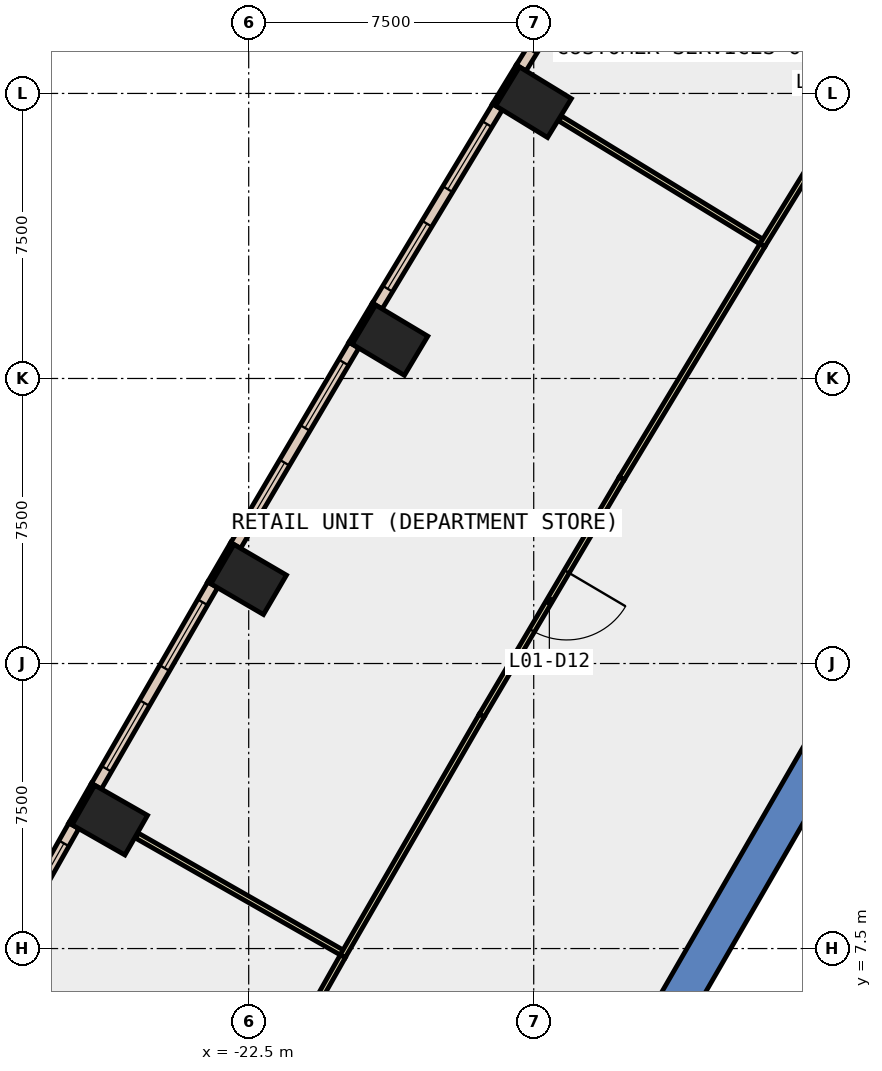
"""IFC4 building model, lengths in metres.
Left out: names, types, materials, properties, quantities, classifications, styles, units other than length and angle.
Written with IfcOpenShell. Run it as: python <this file> out.ifc"""

import sys

from ifc_helpers import new_model, si_unit, direction, frame, frame_2d, origin, origin_2d, place, context, subcontext, project, spatial, polyline, rectangle, outline, extrude, element, fill, save


model = new_model("IFC4")
c1 = context("Model", 3, precision=1e-05, world=origin(), true_north=direction((0.0, 1.0)))
c2 = subcontext(c1, "Body", "Model", "MODEL_VIEW")
j1 = project(units=[si_unit("LENGTHUNIT", "METRE"), si_unit("PLANEANGLEUNIT", "RADIAN")], contexts=[c1])
p1 = place(None, origin())
s1 = spatial("IfcSite", under=j1, at=p1, CompositionType="ELEMENT")
p2 = place(p1, origin())
s2 = spatial("IfcBuilding", under=s1, at=p2, CompositionType="ELEMENT")
p3 = place(p2, frame((0.0, 0.0, 9.0)))
s3 = spatial("IfcBuildingStorey", under=s2, at=p3, CompositionType="ELEMENT", Elevation=9.0)
for number, where, z_axis, x_axis in (
    (1, (-15.005, 29.769, -0.45), (0.0, 0.0, 1.0), (0.522, 0.853, 0.0)),
    (2, (-18.782, 23.508, -0.45), (0.0, 0.0, 1.0), (0.513, 0.858, 0.0)),
    (3, (-22.5, 17.211, -0.45), (0.0, 0.0, 1.0), (0.504, 0.864, 0.0)),
    (4, (-26.155, 10.88, -0.45), (0.0, 0.0, 1.0), (0.496, 0.869, 0.0)),
):
    element("IfcColumn", number, at=place(p3, frame(where, z_axis=z_axis, x_axis=x_axis)), inside=s3, PredefinedType="COLUMN", context=c2, shape_type="SweptSolid", body=[
        extrude(rectangle(XDim=1.2, YDim=1.6, at=origin_2d()), origin(), (0.0, 0.0, 1.0), 6.0),
    ])
p4 = place(p3, frame((0.0, 0.0, -0.45)))
e5 = element("IfcWall", 5, at=p4, inside=s3, PredefinedType="SHEAR", context=c2, shape_type="SweptSolid", body=[
    extrude(outline(polyline([(-12.267, 5.252), (-11.402, 4.752), (-6.351, 13.5), (-6.928, 14.5), (-12.267, 5.252)])), origin(), (0.0, 0.0, 1.0), 6.0),
])
p5 = place(p3, frame((-15.417, 30.724, 0.0), z_axis=(0.0, 0.0, 1.0), x_axis=(-0.521507599072, -0.853246637327, 0.0)))
e6 = element("IfcWall", 6, at=p5, inside=s3, PredefinedType="STANDARD", context=c2, shape_type="SweptSolid", body=[
    extrude(rectangle(XDim=1.2, YDim=0.1, at=frame_2d((0.6, 0.0))), origin(), (0.0, 0.0, 1.0), 5.55),
])
p6 = place(p3, frame((-19.204, 24.459, 0.0), z_axis=(0.0, 0.0, 1.0), x_axis=(-0.513238760752, -0.858245870635, 0.0)))
e7 = element("IfcWall", 7, at=p6, inside=s3, PredefinedType="STANDARD", context=c2, shape_type="SweptSolid", body=[
    extrude(rectangle(XDim=1.2, YDim=0.1, at=frame_2d((0.6, 0.0))), origin(), (0.0, 0.0, 1.0), 5.55),
])
p7 = place(p3, frame((-22.931, 18.158, 0.0), z_axis=(0.0, 0.0, 1.0), x_axis=(-0.504313844903, -0.863520437418, 0.0)))
e8 = element("IfcWall", 8, at=p7, inside=s3, PredefinedType="STANDARD", context=c2, shape_type="SweptSolid", body=[
    extrude(rectangle(XDim=1.2, YDim=0.1, at=frame_2d((0.6, 0.0))), origin(), (0.0, 0.0, 1.0), 5.55),
])
p8 = place(p3, frame((-26.596, 11.822, 0.0), z_axis=(0.0, 0.0, 1.0), x_axis=(-0.495854054996, -0.868405870629, 0.0)))
e9 = element("IfcWall", 9, at=p8, inside=s3, PredefinedType="STANDARD", context=c2, shape_type="SweptSolid", body=[
    extrude(rectangle(XDim=1.2, YDim=0.1, at=frame_2d((0.6, 0.0))), origin(), (0.0, 0.0, 1.0), 5.55),
])
p9 = place(p3, frame((-12.117, 35.881, 0.0), z_axis=(0.0, 0.0, 1.0), x_axis=(-0.524953701886, -0.85113078365, 0.0)))
e10 = element("IfcWall", 10, at=p9, inside=s3, PredefinedType="STANDARD", context=c2, shape_type="SweptSolid", body=[
    extrude(rectangle(XDim=6.123, YDim=0.3, at=frame_2d((3.061, 0.0))), origin(), (0.0, 0.0, 1.0), 5.55),
])
p10 = place(p9, frame((0.531, 0.0, 1.0)))
e11 = element("IfcOpeningElement", 11, at=p10, cuts=e10, PredefinedType="OPENING", context=c2, shape_type="SweptSolid", body=[
    extrude(rectangle(XDim=2.0, YDim=4.0, at=frame_2d((1.0, 2.0))), frame((0.0, 0.16, 0.0), z_axis=(0.0, -1.0, 0.0), x_axis=(1.0, 0.0, 0.0)), (0.0, 0.0, 1.0), 0.32),
])
p11 = place(p9, frame((3.592, 0.0, 1.0)))
e12 = element("IfcOpeningElement", 12, at=p11, cuts=e10, PredefinedType="OPENING", context=c2, shape_type="SweptSolid", body=[
    extrude(rectangle(XDim=2.0, YDim=4.0, at=frame_2d((1.0, 2.0))), frame((0.0, 0.16, 0.0), z_axis=(0.0, -1.0, 0.0), x_axis=(1.0, 0.0, 0.0)), (0.0, 0.0, 1.0), 0.32),
])
p12 = place(p3, frame((-15.954, 29.647, 0.0), z_axis=(0.0, 0.0, 1.0), x_axis=(-0.516687651362, -0.85617397235, 0.0)))
e13 = element("IfcWall", 13, at=p12, inside=s3, PredefinedType="STANDARD", context=c2, shape_type="SweptSolid", body=[
    extrude(rectangle(XDim=6.121, YDim=0.3, at=frame_2d((3.061, 0.0))), origin(), (0.0, 0.0, 1.0), 5.55),
])
p13 = place(p12, frame((0.53, 0.0, 1.0)))
e14 = element("IfcOpeningElement", 14, at=p13, cuts=e13, PredefinedType="OPENING", context=c2, shape_type="SweptSolid", body=[
    extrude(rectangle(XDim=2.0, YDim=4.0, at=frame_2d((1.0, 2.0))), frame((0.0, 0.16, 0.0), z_axis=(0.0, -1.0, 0.0), x_axis=(1.0, 0.0, 0.0)), (0.0, 0.0, 1.0), 0.32),
])
p14 = place(p12, frame((3.591, 0.0, 1.0)))
e15 = element("IfcOpeningElement", 15, at=p14, cuts=e13, PredefinedType="OPENING", context=c2, shape_type="SweptSolid", body=[
    extrude(rectangle(XDim=2.0, YDim=4.0, at=frame_2d((1.0, 2.0))), frame((0.0, 0.16, 0.0), z_axis=(0.0, -1.0, 0.0), x_axis=(1.0, 0.0, 0.0)), (0.0, 0.0, 1.0), 0.32),
])
p15 = place(p3, frame((-19.731, 23.377, 0.0), z_axis=(0.0, 0.0, 1.0), x_axis=(-0.50834231483, -0.861155091115, 0.0)))
e16 = element("IfcWall", 16, at=p15, inside=s3, PredefinedType="STANDARD", context=c2, shape_type="SweptSolid", body=[
    extrude(rectangle(XDim=6.122, YDim=0.3, at=frame_2d((3.061, 0.0))), origin(), (0.0, 0.0, 1.0), 5.55),
])
p16 = place(p15, frame((0.53, 0.0, 1.0)))
e17 = element("IfcOpeningElement", 17, at=p16, cuts=e16, PredefinedType="OPENING", context=c2, shape_type="SweptSolid", body=[
    extrude(rectangle(XDim=2.0, YDim=4.0, at=frame_2d((1.0, 2.0))), frame((0.0, 0.16, 0.0), z_axis=(0.0, -1.0, 0.0), x_axis=(1.0, 0.0, 0.0)), (0.0, 0.0, 1.0), 0.32),
])
p17 = place(p15, frame((3.591, 0.0, 1.0)))
e18 = element("IfcOpeningElement", 18, at=p17, cuts=e16, PredefinedType="OPENING", context=c2, shape_type="SweptSolid", body=[
    extrude(rectangle(XDim=2.0, YDim=4.0, at=frame_2d((1.0, 2.0))), frame((0.0, 0.16, 0.0), z_axis=(0.0, -1.0, 0.0), x_axis=(1.0, 0.0, 0.0)), (0.0, 0.0, 1.0), 0.32),
])
p18 = place(p3, frame((-23.447, 17.071, 0.0), z_axis=(0.0, 0.0, 1.0), x_axis=(-0.499939977436, -0.866060055055, 0.0)))
e19 = element("IfcWall", 19, at=p18, inside=s3, PredefinedType="STANDARD", context=c2, shape_type="SweptSolid", body=[
    extrude(rectangle(XDim=6.121, YDim=0.3, at=frame_2d((3.061, 0.0))), origin(), (0.0, 0.0, 1.0), 5.55),
])
p19 = place(p18, frame((0.53, 0.0, 1.0)))
e20 = element("IfcOpeningElement", 20, at=p19, cuts=e19, PredefinedType="OPENING", context=c2, shape_type="SweptSolid", body=[
    extrude(rectangle(XDim=2.0, YDim=4.0, at=frame_2d((1.0, 2.0))), frame((0.0, 0.16, 0.0), z_axis=(0.0, -1.0, 0.0), x_axis=(1.0, 0.0, 0.0)), (0.0, 0.0, 1.0), 0.32),
])
p20 = place(p18, frame((3.591, 0.0, 1.0)))
e21 = element("IfcOpeningElement", 21, at=p20, cuts=e19, PredefinedType="OPENING", context=c2, shape_type="SweptSolid", body=[
    extrude(rectangle(XDim=2.0, YDim=4.0, at=frame_2d((1.0, 2.0))), frame((0.0, 0.16, 0.0), z_axis=(0.0, -1.0, 0.0), x_axis=(1.0, 0.0, 0.0)), (0.0, 0.0, 1.0), 0.32),
])
p21 = place(p3, frame((-27.101, 10.73, 0.0), z_axis=(0.0, 0.0, 1.0), x_axis=(-0.491661677717, -0.870786308267, 0.0)))
e22 = element("IfcWall", 22, at=p21, inside=s3, PredefinedType="STANDARD", context=c2, shape_type="SweptSolid", body=[
    extrude(rectangle(XDim=6.122, YDim=0.3, at=frame_2d((3.061, 0.0))), origin(), (0.0, 0.0, 1.0), 5.55),
])
p22 = place(p21, frame((0.531, 0.0, 1.0)))
e23 = element("IfcOpeningElement", 23, at=p22, cuts=e22, PredefinedType="OPENING", context=c2, shape_type="SweptSolid", body=[
    extrude(rectangle(XDim=2.0, YDim=4.0, at=frame_2d((1.0, 2.0))), frame((0.0, 0.16, 0.0), z_axis=(0.0, -1.0, 0.0), x_axis=(1.0, 0.0, 0.0)), (0.0, 0.0, 1.0), 0.32),
])
p23 = place(p21, frame((3.592, 0.0, 1.0)))
e24 = element("IfcOpeningElement", 24, at=p23, cuts=e22, PredefinedType="OPENING", context=c2, shape_type="SweptSolid", body=[
    extrude(rectangle(XDim=2.0, YDim=4.0, at=frame_2d((1.0, 2.0))), frame((0.0, 0.16, 0.0), z_axis=(0.0, -1.0, 0.0), x_axis=(1.0, 0.0, 0.0)), (0.0, 0.0, 1.0), 0.32),
])
p24 = place(p3, frame((-8.947, 26.065, 0.0), z_axis=(0.0, 0.0, 1.0), x_axis=(-0.853151116909, 0.521663849348, 0.0)))
e25 = element("IfcWall", 25, at=p24, inside=s3, PredefinedType="PARTITIONING", context=c2, shape_type="SweptSolid", body=[
    extrude(rectangle(XDim=6.28, YDim=0.15, at=frame_2d((3.14, 0.0))), origin(), (0.0, 0.0, 1.0), 5.55),
])
p25 = place(p3, frame((-5.141, 32.238, 0.0), z_axis=(0.0, 0.0, 1.0), x_axis=(-0.52478961199, -0.851231967884, 0.0)))
e26 = element("IfcWall", 26, at=p25, inside=s3, PredefinedType="PARTITIONING", context=c2, shape_type="SweptSolid", body=[
    extrude(rectangle(XDim=7.319, YDim=0.15, at=frame_2d((3.659, 0.0))), origin(), (0.0, 0.0, 1.0), 5.55),
])
p26 = place(p25, frame((3.11, 0.0, 0.0)))
e27 = element("IfcOpeningElement", 27, at=p26, cuts=e26, PredefinedType="OPENING", context=c2, shape_type="SweptSolid", body=[
    extrude(rectangle(XDim=1.0, YDim=2.1, at=frame_2d((0.5, 1.05))), frame((0.0, 0.085, 0.0), z_axis=(0.0, -1.0, 0.0), x_axis=(1.0, 0.0, 0.0)), (0.0, 0.0, 1.0), 0.17),
])
p27 = place(p3, frame((-19.989, 7.361, 0.0), z_axis=(0.0, 0.0, 1.0), x_axis=(-0.868573128473, 0.495561015914, 0.0)))
e28 = element("IfcWall", 28, at=p27, inside=s3, PredefinedType="PARTITIONING", context=c2, shape_type="SweptSolid", body=[
    extrude(rectangle(XDim=6.279, YDim=0.15, at=frame_2d((3.14, 0.0))), origin(), (0.0, 0.0, 1.0), 5.55),
])
p28 = place(p3, frame((-8.981, 26.008, 0.0), z_axis=(0.0, 0.0, 1.0), x_axis=(-0.516682614934, -0.856177011736, 0.0)))
e29 = element("IfcWall", 29, at=p28, inside=s3, PredefinedType="PARTITIONING", context=c2, shape_type="SweptSolid", body=[
    extrude(rectangle(XDim=7.169, YDim=0.15, at=frame_2d((3.584, 0.0))), origin(), (0.0, 0.0, 1.0), 5.55),
])
p29 = place(p3, frame((-12.685, 19.87, 0.0), z_axis=(0.0, 0.0, 1.0), x_axis=(-0.508337575782, -0.861157888571, 0.0)))
e30 = element("IfcWall", 30, at=p29, inside=s3, PredefinedType="PARTITIONING", context=c2, shape_type="SweptSolid", body=[
    extrude(rectangle(XDim=7.245, YDim=0.15, at=frame_2d((3.623, 0.0))), origin(), (0.0, 0.0, 1.0), 5.55),
])
p30 = place(p29, frame((2.845, 0.0, 0.0)))
e31 = element("IfcOpeningElement", 31, at=p30, cuts=e30, PredefinedType="OPENING", context=c2, shape_type="SweptSolid", body=[
    extrude(rectangle(XDim=1.8, YDim=2.1, at=frame_2d((0.9, 1.05))), frame((0.0, 0.085, 0.0), z_axis=(0.0, -1.0, 0.0), x_axis=(1.0, 0.0, 0.0)), (0.0, 0.0, 1.0), 0.17),
])
p31 = place(p3, frame((-16.368, 13.631, 0.0), z_axis=(0.0, 0.0, 1.0), x_axis=(-0.500158615396, -0.865933807774, 0.0)))
e32 = element("IfcWall", 32, at=p31, inside=s3, PredefinedType="PARTITIONING", context=c2, shape_type="SweptSolid", body=[
    extrude(rectangle(XDim=7.316, YDim=0.15, at=frame_2d((3.658, 0.0))), origin(), (0.0, 0.0, 1.0), 5.55),
])
p32 = place(p3, frame((-20.025, 7.295, 0.0), z_axis=(0.0, 0.0, 1.0), x_axis=(-0.491633098341, -0.87080244408, 0.0)))
e33 = element("IfcWall", 33, at=p32, inside=s3, PredefinedType="PARTITIONING", context=c2, shape_type="SweptSolid", body=[
    extrude(rectangle(XDim=7.17, YDim=0.15, at=frame_2d((3.585, 0.0))), origin(), (0.0, 0.0, 1.0), 5.55),
])
p33 = place(p3, frame((-5.03, 9.388, 0.0), z_axis=(0.0, 0.0, 1.0), x_axis=(-0.499978703459, -0.866037698999, 0.0)))
e34 = element("IfcWall", 34, at=p33, inside=s3, PredefinedType="STANDARD", context=c2, shape_type="SweptSolid", body=[
    extrude(rectangle(XDim=6.9, YDim=0.2, at=frame_2d((3.45, 0.0))), origin(), (0.0, 0.0, 1.0), 5.55),
])
p34 = place(p13, origin())
e35 = element("IfcWindow", 35, at=p34, inside=s3, PartitioningType="SINGLE_PANEL", PredefinedType="WINDOW", context=c2, shape_type="SweptSolid", body=[
    extrude(rectangle(XDim=2.0, YDim=4.0, at=frame_2d((1.0, 2.0))), frame((0.0, 0.03, 0.0), z_axis=(0.0, -1.0, 0.0), x_axis=(1.0, 0.0, 0.0)), (0.0, 0.0, 1.0), 0.06),
])
fill(e14, e35)
p35 = place(p14, origin())
e36 = element("IfcWindow", 36, at=p35, inside=s3, PartitioningType="SINGLE_PANEL", PredefinedType="WINDOW", context=c2, shape_type="SweptSolid", body=[
    extrude(rectangle(XDim=2.0, YDim=4.0, at=frame_2d((1.0, 2.0))), frame((0.0, 0.03, 0.0), z_axis=(0.0, -1.0, 0.0), x_axis=(1.0, 0.0, 0.0)), (0.0, 0.0, 1.0), 0.06),
])
fill(e15, e36)
p36 = place(p16, origin())
e37 = element("IfcWindow", 37, at=p36, inside=s3, PartitioningType="SINGLE_PANEL", PredefinedType="WINDOW", context=c2, shape_type="SweptSolid", body=[
    extrude(rectangle(XDim=2.0, YDim=4.0, at=frame_2d((1.0, 2.0))), frame((0.0, 0.03, 0.0), z_axis=(0.0, -1.0, 0.0), x_axis=(1.0, 0.0, 0.0)), (0.0, 0.0, 1.0), 0.06),
])
fill(e17, e37)
p37 = place(p17, origin())
e38 = element("IfcWindow", 38, at=p37, inside=s3, PartitioningType="SINGLE_PANEL", PredefinedType="WINDOW", context=c2, shape_type="SweptSolid", body=[
    extrude(rectangle(XDim=2.0, YDim=4.0, at=frame_2d((1.0, 2.0))), frame((0.0, 0.03, 0.0), z_axis=(0.0, -1.0, 0.0), x_axis=(1.0, 0.0, 0.0)), (0.0, 0.0, 1.0), 0.06),
])
fill(e18, e38)
p38 = place(p19, origin())
e39 = element("IfcWindow", 39, at=p38, inside=s3, PartitioningType="SINGLE_PANEL", PredefinedType="WINDOW", context=c2, shape_type="SweptSolid", body=[
    extrude(rectangle(XDim=2.0, YDim=4.0, at=frame_2d((1.0, 2.0))), frame((0.0, 0.03, 0.0), z_axis=(0.0, -1.0, 0.0), x_axis=(1.0, 0.0, 0.0)), (0.0, 0.0, 1.0), 0.06),
])
fill(e20, e39)
p39 = place(p20, origin())
e40 = element("IfcWindow", 40, at=p39, inside=s3, PartitioningType="SINGLE_PANEL", PredefinedType="WINDOW", context=c2, shape_type="SweptSolid", body=[
    extrude(rectangle(XDim=2.0, YDim=4.0, at=frame_2d((1.0, 2.0))), frame((0.0, 0.03, 0.0), z_axis=(0.0, -1.0, 0.0), x_axis=(1.0, 0.0, 0.0)), (0.0, 0.0, 1.0), 0.06),
])
fill(e21, e40)
p40 = place(p22, origin())
e41 = element("IfcWindow", 41, at=p40, inside=s3, PartitioningType="SINGLE_PANEL", PredefinedType="WINDOW", context=c2, shape_type="SweptSolid", body=[
    extrude(rectangle(XDim=2.0, YDim=4.0, at=frame_2d((1.0, 2.0))), frame((0.0, 0.03, 0.0), z_axis=(0.0, -1.0, 0.0), x_axis=(1.0, 0.0, 0.0)), (0.0, 0.0, 1.0), 0.06),
])
fill(e23, e41)
p41 = place(p30, origin())
e42 = element("IfcDoor", 42, at=p41, inside=s3, OperationType="DOUBLE_DOOR_SINGLE_SWING", PredefinedType="DOOR", context=c2, shape_type="SweptSolid", body=[
    extrude(rectangle(XDim=1.8, YDim=2.1, at=frame_2d((0.9, 1.05))), frame((0.0, 0.025, 0.0), z_axis=(0.0, -1.0, 0.0), x_axis=(1.0, 0.0, 0.0)), (0.0, 0.0, 1.0), 0.05),
])
fill(e31, e42)
save(model, sys.argv[1])
